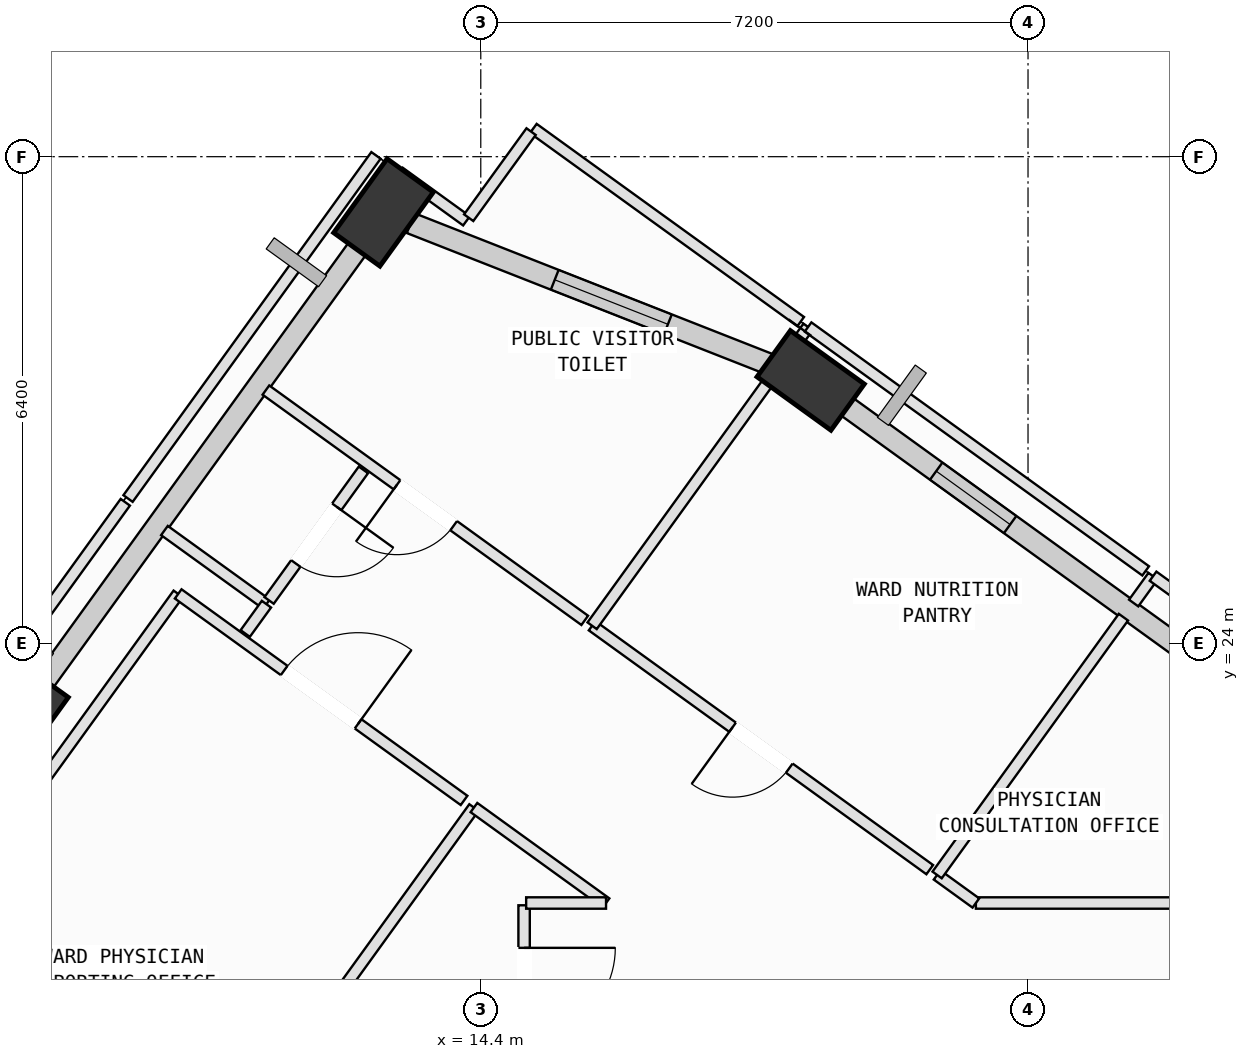
"""IFC4 building model, lengths in metres.
Left out: names, types, materials, properties, quantities, classifications, styles, units other than length and angle.
Written with IfcOpenShell. Run it as: python <this file> out.ifc"""

import sys

from ifc_helpers import new_model, si_unit, direction, frame, frame_2d, origin, origin_2d, place, context, subcontext, project, spatial, rectangle, extrude, element, fill, save


model = new_model("IFC4")
c1 = context("Model", 3, precision=1e-05, world=origin(), true_north=direction((0.0, 1.0)))
c2 = subcontext(c1, "Body", "Model", "MODEL_VIEW")
j1 = project(units=[si_unit("LENGTHUNIT", "METRE"), si_unit("PLANEANGLEUNIT", "RADIAN")], contexts=[c1])
p1 = place(None, origin())
s1 = spatial("IfcSite", under=j1, at=p1, CompositionType="ELEMENT")
p2 = place(p1, origin())
s2 = spatial("IfcBuilding", under=s1, at=p2, CompositionType="ELEMENT")
p3 = place(p2, frame((0.0, 0.0, 255.2)))
s3 = spatial("IfcBuildingStorey", under=s2, at=p3, CompositionType="ELEMENT", Elevation=255.2)
p4 = place(p3, frame((18.74, 27.456, 0.002), z_axis=(-0.010426179939, -0.061581530636, 0.998047598993), x_axis=(-0.7016048019, 0.711626761454, 0.036579425007)))
e1 = element("IfcColumn", 1, at=p4, inside=s3, PredefinedType="COLUMN", context=c2, shape_type="SweptSolid", body=[
    extrude(rectangle(XDim=1.2, YDim=0.75, at=origin_2d()), origin(), (0.0, 0.0, 1.0), 4.004),
])
p5 = place(p3, frame((13.12, 29.666, 0.002), z_axis=(-0.019414311893, -0.08471699735, 0.996215897712), x_axis=(0.751239915537, 0.65625887823, 0.070447668859)))
e2 = element("IfcColumn", 2, at=p5, inside=s3, PredefinedType="COLUMN", context=c2, shape_type="SweptSolid", body=[
    extrude(rectangle(XDim=1.2, YDim=0.75, at=origin_2d()), origin(), (0.0, 0.0, 1.0), 4.011),
])
p6 = place(p3, frame((8.318, 23.02, 0.002), z_axis=(0.008202176681, -0.10413726542, 0.994529111816), x_axis=(0.520560631231, 0.849616141392, 0.084670192506)))
e3 = element("IfcColumn", 3, at=p6, inside=s3, PredefinedType="COLUMN", context=c2, shape_type="SweptSolid", body=[
    extrude(rectangle(XDim=1.2, YDim=0.75, at=origin_2d()), origin(), (0.0, 0.0, 1.0), 4.018),
])
p7 = place(p3, frame((19.094, 27.2, 0.0), z_axis=(0.0, 0.0, 1.0), x_axis=(0.810562962933, -0.585651503132, 0.0)))
e4 = element("IfcWall", 4, at=p7, inside=s3, PredefinedType="SOLIDWALL", context=c2, shape_type="SweptSolid", body=[
    extrude(rectangle(XDim=6.424, YDim=0.28, at=frame_2d((3.212, 0.0))), origin(), (0.0, 0.0, 1.0), 3.265),
])
p8 = place(p7, frame((1.601, 0.0, 0.75)))
e5 = element("IfcOpeningElement", 5, at=p8, cuts=e4, PredefinedType="OPENING", context=c2, shape_type="SweptSolid", body=[
    extrude(rectangle(XDim=1.2, YDim=1.75, at=frame_2d((0.6, 0.875))), frame((0.0, 0.15, 0.0), z_axis=(0.0, -1.0, 0.0), x_axis=(1.0, 0.0, 0.0)), (0.0, 0.0, 1.0), 0.3),
])
p9 = place(p3, frame((13.478, 29.526, 0.0), z_axis=(0.0, 0.0, 1.0), x_axis=(0.930610950032, -0.366009917461, 0.0)))
e6 = element("IfcWall", 6, at=p9, inside=s3, PredefinedType="SOLIDWALL", context=c2, shape_type="SweptSolid", body=[
    extrude(rectangle(XDim=5.302, YDim=0.28, at=frame_2d((2.651, 0.0))), origin(), (0.0, 0.0, 1.0), 3.265),
])
p10 = place(p9, frame((2.037, 0.0, 0.75)))
e7 = element("IfcOpeningElement", 7, at=p10, cuts=e6, PredefinedType="OPENING", context=c2, shape_type="SweptSolid", body=[
    extrude(rectangle(XDim=1.6, YDim=1.95, at=frame_2d((0.8, 0.975))), frame((0.0, 0.15, 0.0), z_axis=(0.0, -1.0, 0.0), x_axis=(1.0, 0.0, 0.0)), (0.0, 0.0, 1.0), 0.3),
])
p11 = place(p3, frame((8.443, 23.193, 0.0), z_axis=(0.0, 0.0, 1.0), x_axis=(0.585665597158, 0.810552779469, 0.0)))
e8 = element("IfcWall", 8, at=p11, inside=s3, PredefinedType="SOLIDWALL", context=c2, shape_type="SweptSolid", body=[
    extrude(rectangle(XDim=7.434, YDim=0.28, at=frame_2d((3.717, 0.0))), origin(), (0.0, 0.0, 1.0), 3.265),
])
p12 = place(p3, frame((14.97, 20.55, 0.0), z_axis=(0.0, 0.0, 1.0), x_axis=(0.0, -1.0, 0.0)))
e9 = element("IfcWall", 9, at=p12, inside=s3, PredefinedType="PARTITIONING", context=c2, shape_type="SweptSolid", body=[
    extrude(rectangle(XDim=2.32, YDim=0.15, at=frame_2d((1.16, 0.0))), origin(), (0.0, 0.0, 1.0), 3.78),
])
p13 = place(p12, frame((0.56, 0.0, 0.0)))
e10 = element("IfcOpeningElement", 10, at=p13, cuts=e9, PredefinedType="OPENING", context=c2, shape_type="SweptSolid", body=[
    extrude(rectangle(XDim=1.2, YDim=2.15, at=frame_2d((0.6, 1.075))), frame((0.0, 0.085, 0.0), z_axis=(0.0, -1.0, 0.0), x_axis=(1.0, 0.0, 0.0)), (0.0, 0.0, 1.0), 0.17),
])
p14 = place(p3, frame((6.324, 10.784, 0.0), z_axis=(0.0, 0.0, 1.0), x_axis=(0.585687308948, 0.810537091155, 0.0)))
e11 = element("IfcWall", 11, at=p14, inside=s3, PredefinedType="PARTITIONING", context=c2, shape_type="SweptSolid", body=[
    extrude(rectangle(XDim=13.635, YDim=0.15, at=frame_2d((6.818, 0.0))), origin(), (0.0, 0.0, 1.0), 3.78),
])
p15 = place(p3, frame((14.31, 21.836, 0.0), z_axis=(0.0, 0.0, 1.0), x_axis=(0.810544103315, -0.585677604643, 0.0)))
e12 = element("IfcWall", 12, at=p15, inside=s3, PredefinedType="PARTITIONING", context=c2, shape_type="SweptSolid", body=[
    extrude(rectangle(XDim=2.144, YDim=0.15, at=frame_2d((1.072, 0.0))), origin(), (0.0, 0.0, 1.0), 3.78),
])
p16 = place(p3, frame((16.048, 20.58, 0.0), z_axis=(0.0, 0.0, 1.0), x_axis=(-1.0, 0.0, 0.0)))
e13 = element("IfcWall", 13, at=p16, inside=s3, PredefinedType="PARTITIONING", context=c2, shape_type="SweptSolid", body=[
    extrude(rectangle(XDim=1.051, YDim=0.15, at=frame_2d((0.525, 0.0))), origin(), (0.0, 0.0, 1.0), 3.78),
])
p17 = place(p3, frame((3.896, 15.619, 0.0), z_axis=(0.0, 0.0, 1.0), x_axis=(0.585648203919, 0.810565346685, 0.0)))
e14 = element("IfcWall", 14, at=p17, inside=s3, PredefinedType="PARTITIONING", context=c2, shape_type="SweptSolid", body=[
    extrude(rectangle(XDim=11.138, YDim=0.15, at=frame_2d((5.569, 0.0))), origin(), (0.0, 0.0, 1.0), 3.265),
])
p18 = place(p3, frame((10.419, 24.647, 0.0), z_axis=(0.0, 0.0, 1.0), x_axis=(0.810600131972, -0.585600056392, 0.0)))
e15 = element("IfcWall", 15, at=p18, inside=s3, PredefinedType="PARTITIONING", context=c2, shape_type="SweptSolid", body=[
    extrude(rectangle(XDim=4.64, YDim=0.15, at=frame_2d((2.32, 0.0))), origin(), (0.0, 0.0, 1.0), 3.78),
])
p19 = place(p18, frame((1.72, 0.0, 0.0)))
e16 = element("IfcOpeningElement", 16, at=p19, cuts=e15, PredefinedType="OPENING", context=c2, shape_type="SweptSolid", body=[
    extrude(rectangle(XDim=1.2, YDim=2.15, at=frame_2d((0.6, 1.075))), frame((0.0, 0.085, 0.0), z_axis=(0.0, -1.0, 0.0), x_axis=(1.0, 0.0, 0.0)), (0.0, 0.0, 1.0), 0.17),
])
p20 = place(p3, frame((28.043, 20.58, 0.0), z_axis=(0.0, 0.0, 1.0), x_axis=(-1.0, 0.0, 0.0)))
e17 = element("IfcWall", 17, at=p20, inside=s3, PredefinedType="PARTITIONING", context=c2, shape_type="SweptSolid", body=[
    extrude(rectangle(XDim=7.129, YDim=0.15, at=frame_2d((3.564, 0.0))), origin(), (0.0, 0.0, 1.0), 3.415),
])
p21 = place(p20, frame((3.338, 0.0, 0.0)))
e18 = element("IfcOpeningElement", 18, at=p21, cuts=e17, PredefinedType="OPENING", context=c2, shape_type="SweptSolid", body=[
    extrude(rectangle(XDim=1.0, YDim=2.12, at=frame_2d((0.5, 1.06))), frame((0.0, 0.085, 0.0), z_axis=(0.0, -1.0, 0.0), x_axis=(1.0, 0.0, 0.0)), (0.0, 0.0, 1.0), 0.17),
])
p22 = place(p3, frame((20.914, 20.58, 0.0), z_axis=(0.0, 0.0, 1.0), x_axis=(-0.810259680678, 0.586071028006, 0.0)))
e19 = element("IfcWall", 19, at=p22, inside=s3, PredefinedType="PARTITIONING", context=c2, shape_type="SweptSolid", body=[
    extrude(rectangle(XDim=0.629, YDim=0.15, at=frame_2d((0.315, 0.0))), origin(), (0.0, 0.0, 1.0), 3.415),
])
p23 = place(p3, frame((20.404, 20.949, 0.0), z_axis=(0.0, 0.0, 1.0), x_axis=(0.585660941612, 0.810556143317, 0.0)))
e20 = element("IfcWall", 20, at=p23, inside=s3, PredefinedType="PARTITIONING", context=c2, shape_type="SweptSolid", body=[
    extrude(rectangle(XDim=4.185, YDim=0.15, at=frame_2d((2.092, 0.0))), origin(), (0.0, 0.0, 1.0), 3.78),
])
p24 = place(p3, frame((22.99, 24.527, 0.0), z_axis=(0.0, 0.0, 1.0), x_axis=(0.586002294108, 0.810309392331, 0.0)))
e21 = element("IfcWall", 21, at=p24, inside=s3, PredefinedType="PARTITIONING", context=c2, shape_type="SweptSolid", body=[
    extrude(rectangle(XDim=0.435, YDim=0.15, at=frame_2d((0.218, 0.0))), origin(), (0.0, 0.0, 1.0), 3.78),
])
p25 = place(p3, frame((23.245, 24.88, 0.0), z_axis=(0.0, 0.0, 1.0), x_axis=(0.810493760552, -0.585747269824, 0.0)))
e22 = element("IfcWall", 22, at=p25, inside=s3, PredefinedType="PARTITIONING", context=c2, shape_type="SweptSolid", body=[
    extrude(rectangle(XDim=6.18, YDim=0.15, at=frame_2d((3.09, 0.0))), origin(), (0.0, 0.0, 1.0), 3.78),
])
p26 = place(p3, frame((20.307, 21.019, 0.0), z_axis=(0.0, 0.0, 1.0), x_axis=(-0.810596982644, 0.585604415735, 0.0)))
e23 = element("IfcWall", 23, at=p26, inside=s3, PredefinedType="PARTITIONING", context=c2, shape_type="SweptSolid", body=[
    extrude(rectangle(XDim=5.48, YDim=0.15, at=frame_2d((2.74, 0.0))), origin(), (0.0, 0.0, 1.0), 3.415),
])
p27 = place(p26, frame((2.28, 0.0, 0.0)))
e24 = element("IfcOpeningElement", 24, at=p27, cuts=e23, PredefinedType="OPENING", context=c2, shape_type="SweptSolid", body=[
    extrude(rectangle(XDim=0.92, YDim=2.1, at=frame_2d((0.46, 1.05))), frame((0.0, 0.085, 0.0), z_axis=(0.0, -1.0, 0.0), x_axis=(1.0, 0.0, 0.0)), (0.0, 0.0, 1.0), 0.17),
])
p28 = place(p3, frame((15.865, 24.228, 0.0), z_axis=(0.0, 0.0, 1.0), x_axis=(0.585696470698, 0.810530470872, 0.0)))
e25 = element("IfcWall", 25, at=p28, inside=s3, PredefinedType="PARTITIONING", context=c2, shape_type="SweptSolid", body=[
    extrude(rectangle(XDim=4.069, YDim=0.15, at=frame_2d((2.034, 0.0))), origin(), (0.0, 0.0, 1.0), 3.78),
])
p29 = place(p3, frame((18.387, 27.718, 0.0), z_axis=(0.0, 0.0, 1.0), x_axis=(0.586276407264, 0.81011108762, 0.0)))
e26 = element("IfcWall", 26, at=p29, inside=s3, PredefinedType="PARTITIONING", context=c2, shape_type="SweptSolid", body=[
    extrude(rectangle(XDim=0.544, YDim=0.15, at=frame_2d((0.272, 0.0))), origin(), (0.0, 0.0, 1.0), 3.78),
])
p30 = place(p3, frame((18.706, 28.159, 0.0), z_axis=(0.0, 0.0, 1.0), x_axis=(0.810596982644, -0.585604415735, 0.0)))
e27 = element("IfcWall", 27, at=p30, inside=s3, PredefinedType="PARTITIONING", context=c2, shape_type="SweptSolid", body=[
    extrude(rectangle(XDim=5.48, YDim=0.15, at=frame_2d((2.74, 0.0))), origin(), (0.0, 0.0, 1.0), 3.78),
])
p31 = place(p3, frame((15.091, 30.771, 0.0), z_axis=(0.0, 0.0, 1.0), x_axis=(0.810639171761, -0.585546012887, 0.0)))
e28 = element("IfcWall", 28, at=p31, inside=s3, PredefinedType="PARTITIONING", context=c2, shape_type="SweptSolid", body=[
    extrude(rectangle(XDim=4.34, YDim=0.15, at=frame_2d((2.17, 0.0))), origin(), (0.0, 0.0, 1.0), 3.78),
])
p32 = place(p3, frame((15.768, 24.299, 0.0), z_axis=(0.0, 0.0, 1.0), x_axis=(-0.810655591008, 0.58552328115, 0.0)))
e29 = element("IfcWall", 29, at=p32, inside=s3, PredefinedType="PARTITIONING", context=c2, shape_type="SweptSolid", body=[
    extrude(rectangle(XDim=5.175, YDim=0.15, at=frame_2d((2.587, 0.0))), origin(), (0.0, 0.0, 1.0), 3.78),
])
p33 = place(p32, frame((2.127, 0.0, 0.0)))
e30 = element("IfcOpeningElement", 30, at=p33, cuts=e29, PredefinedType="OPENING", context=c2, shape_type="SweptSolid", body=[
    extrude(rectangle(XDim=0.92, YDim=2.1, at=frame_2d((0.46, 1.05))), frame((0.0, 0.085, 0.0), z_axis=(0.0, -1.0, 0.0), x_axis=(1.0, 0.0, 0.0)), (0.0, 0.0, 1.0), 0.17),
])
p34 = place(p3, frame((12.643, 29.33, 0.0), z_axis=(0.0, 0.0, 1.0), x_axis=(0.585611940367, 0.810591546526, 0.0)))
e31 = element("IfcWall", 31, at=p34, inside=s3, PredefinedType="PARTITIONING", context=c2, shape_type="SweptSolid", body=[
    extrude(rectangle(XDim=1.102, YDim=0.15, at=frame_2d((0.551, 0.0))), origin(), (0.0, 0.0, 1.0), 3.265),
])
p35 = place(p3, frame((13.329, 30.194, 0.0), z_axis=(0.0, 0.0, 1.0), x_axis=(0.81041911431, -0.585850543365, 0.0)))
e32 = element("IfcWall", 32, at=p35, inside=s3, PredefinedType="PARTITIONING", context=c2, shape_type="SweptSolid", body=[
    extrude(rectangle(XDim=1.089, YDim=0.15, at=frame_2d((0.545, 0.0))), origin(), (0.0, 0.0, 1.0), 3.78),
])
p36 = place(p3, frame((14.241, 29.597, 0.0), z_axis=(0.0, 0.0, 1.0), x_axis=(0.586770274271, 0.809753447187, 0.0)))
e33 = element("IfcWall", 33, at=p36, inside=s3, PredefinedType="PARTITIONING", context=c2, shape_type="SweptSolid", body=[
    extrude(rectangle(XDim=1.399, YDim=0.15, at=frame_2d((0.7, 0.0))), origin(), (0.0, 0.0, 1.0), 3.78),
])
p37 = place(p3, frame((6.362, 21.201, 0.0), z_axis=(0.0, 0.0, 1.0), x_axis=(0.585603930262, 0.810597333367, 0.0)))
e34 = element("IfcWall", 34, at=p37, inside=s3, PredefinedType="PARTITIONING", context=c2, shape_type="SweptSolid", body=[
    extrude(rectangle(XDim=5.739, YDim=0.15, at=frame_2d((2.87, 0.0))), origin(), (0.0, 0.0, 1.0), 3.78),
])
p38 = place(p3, frame((10.238, 25.481, 0.0), z_axis=(0.0, 0.0, 1.0), x_axis=(0.810753116581, -0.585388233529, 0.0)))
e35 = element("IfcWall", 35, at=p38, inside=s3, PredefinedType="PARTITIONING", context=c2, shape_type="SweptSolid", body=[
    extrude(rectangle(XDim=1.655, YDim=0.15, at=frame_2d((0.828, 0.0))), origin(), (0.0, 0.0, 1.0), 3.78),
])
p39 = place(p3, frame((11.58, 24.512, 0.0), z_axis=(0.0, 0.0, 1.0), x_axis=(-0.585883500757, -0.810395288449, 0.0)))
e36 = element("IfcWall", 36, at=p39, inside=s3, PredefinedType="PARTITIONING", context=c2, shape_type="SweptSolid", body=[
    extrude(rectangle(XDim=0.476, YDim=0.15, at=frame_2d((0.238, 0.0))), origin(), (0.0, 0.0, 1.0), 3.78),
])
p40 = place(p3, frame((12.856, 26.279, 0.0), z_axis=(0.0, 0.0, 1.0), x_axis=(-0.585545230092, -0.810639737193, 0.0)))
e37 = element("IfcWall", 37, at=p40, inside=s3, PredefinedType="PARTITIONING", context=c2, shape_type="SweptSolid", body=[
    extrude(rectangle(XDim=2.119, YDim=0.15, at=frame_2d((1.06, 0.0))), origin(), (0.0, 0.0, 1.0), 3.78),
])
p41 = place(p40, frame((0.6, 0.0, 0.0)))
e38 = element("IfcOpeningElement", 38, at=p41, cuts=e37, PredefinedType="OPENING", context=c2, shape_type="SweptSolid", body=[
    extrude(rectangle(XDim=0.92, YDim=2.1, at=frame_2d((0.46, 1.05))), frame((0.0, 0.085, 0.0), z_axis=(0.0, -1.0, 0.0), x_axis=(1.0, 0.0, 0.0)), (0.0, 0.0, 1.0), 0.17),
])
p42 = place(p3, frame((9.759, 25.902, 0.0), z_axis=(0.0, 0.0, 1.0), x_axis=(0.58563297503, 0.810576349617, 0.0)))
e39 = element("IfcWall", 39, at=p42, inside=s3, PredefinedType="PARTITIONING", context=c2, shape_type="SweptSolid", body=[
    extrude(rectangle(XDim=5.57, YDim=0.15, at=frame_2d((2.785, 0.0))), origin(), (0.0, 0.0, 1.0), 3.78),
])
p43 = place(p8, origin())
e40 = element("IfcWindow", 40, at=p43, inside=s3, PartitioningType="SINGLE_PANEL", PredefinedType="WINDOW", context=c2, shape_type="SweptSolid", body=[
    extrude(rectangle(XDim=1.2, YDim=1.75, at=frame_2d((0.6, 0.875))), frame((0.0, 0.03, 0.0), z_axis=(0.0, -1.0, 0.0), x_axis=(1.0, 0.0, 0.0)), (0.0, 0.0, 1.0), 0.06),
])
fill(e5, e40)
p44 = place(p10, origin())
e41 = element("IfcWindow", 41, at=p44, inside=s3, PartitioningType="SINGLE_PANEL", PredefinedType="WINDOW", context=c2, shape_type="SweptSolid", body=[
    extrude(rectangle(XDim=1.6, YDim=1.95, at=frame_2d((0.8, 0.975))), frame((0.0, 0.03, 0.0), z_axis=(0.0, -1.0, 0.0), x_axis=(1.0, 0.0, 0.0)), (0.0, 0.0, 1.0), 0.06),
])
fill(e7, e41)
p45 = place(p13, origin())
e42 = element("IfcDoor", 42, at=p45, inside=s3, OperationType="SINGLE_SWING_LEFT", PredefinedType="DOOR", context=c2, shape_type="SweptSolid", body=[
    extrude(rectangle(XDim=1.2, YDim=2.15, at=frame_2d((0.6, 1.075))), frame((0.0, 0.025, 0.0), z_axis=(0.0, -1.0, 0.0), x_axis=(1.0, 0.0, 0.0)), (0.0, 0.0, 1.0), 0.05),
])
fill(e10, e42)
p46 = place(p19, origin())
e43 = element("IfcDoor", 43, at=p46, inside=s3, OperationType="SINGLE_SWING_RIGHT", PredefinedType="DOOR", context=c2, shape_type="SweptSolid", body=[
    extrude(rectangle(XDim=1.2, YDim=2.15, at=frame_2d((0.6, 1.075))), frame((0.0, 0.025, 0.0), z_axis=(0.0, -1.0, 0.0), x_axis=(1.0, 0.0, 0.0)), (0.0, 0.0, 1.0), 0.05),
])
fill(e16, e43)
p47 = place(p27, origin())
e44 = element("IfcDoor", 44, at=p47, inside=s3, OperationType="SINGLE_SWING_RIGHT", PredefinedType="DOOR", context=c2, shape_type="SweptSolid", body=[
    extrude(rectangle(XDim=0.92, YDim=2.1, at=frame_2d((0.46, 1.05))), frame((0.0, 0.025, 0.0), z_axis=(0.0, -1.0, 0.0), x_axis=(1.0, 0.0, 0.0)), (0.0, 0.0, 1.0), 0.05),
])
fill(e24, e44)
p48 = place(p33, origin())
e45 = element("IfcDoor", 45, at=p48, inside=s3, OperationType="SINGLE_SWING_RIGHT", PredefinedType="DOOR", context=c2, shape_type="SweptSolid", body=[
    extrude(rectangle(XDim=0.92, YDim=2.1, at=frame_2d((0.46, 1.05))), frame((0.0, 0.025, 0.0), z_axis=(0.0, -1.0, 0.0), x_axis=(1.0, 0.0, 0.0)), (0.0, 0.0, 1.0), 0.05),
])
fill(e30, e45)
p49 = place(p41, origin())
e46 = element("IfcDoor", 46, at=p49, inside=s3, OperationType="SINGLE_SWING_LEFT", PredefinedType="DOOR", context=c2, shape_type="SweptSolid", body=[
    extrude(rectangle(XDim=0.92, YDim=2.1, at=frame_2d((0.46, 1.05))), frame((0.0, 0.025, 0.0), z_axis=(0.0, -1.0, 0.0), x_axis=(1.0, 0.0, 0.0)), (0.0, 0.0, 1.0), 0.05),
])
fill(e38, e46)
save(model, sys.argv[1])
